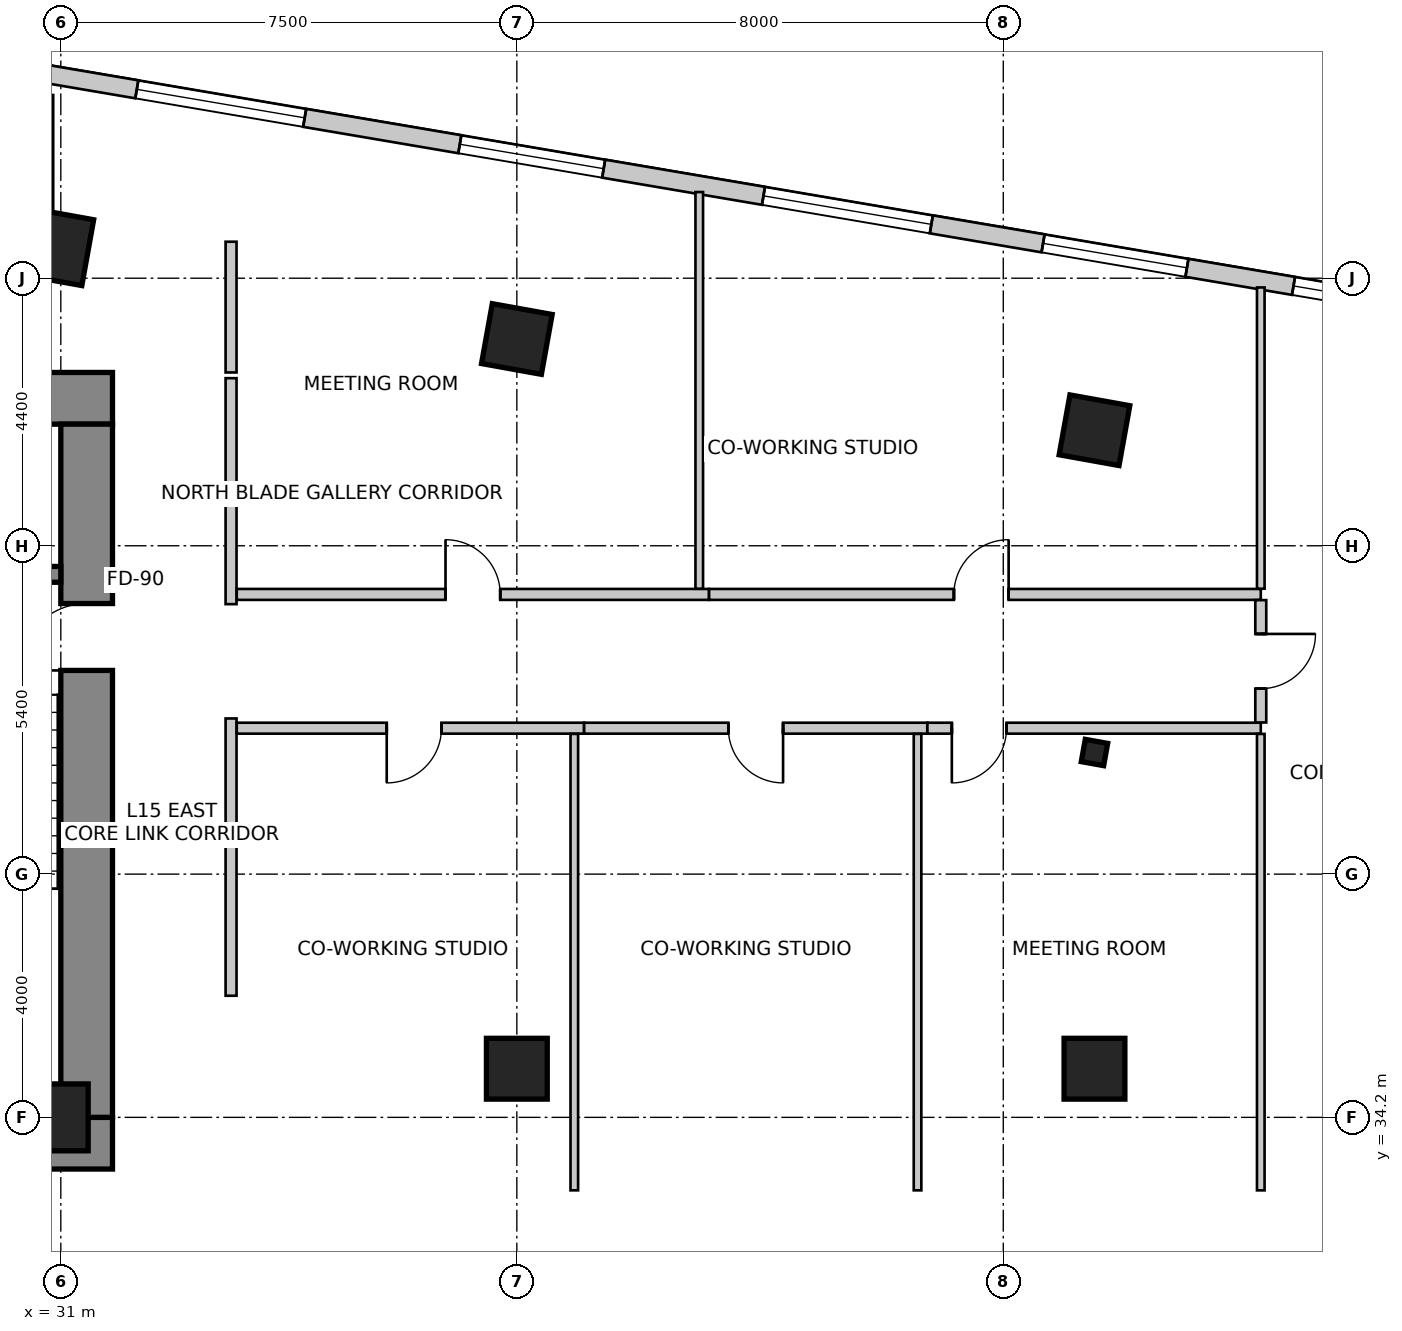
"""IFC4 building model, lengths in metres.
Left out: names, types, materials, properties, quantities, classifications, styles, units other than length and angle.
Written with IfcOpenShell. Run it as: python <this file> out.ifc"""

import sys

from ifc_helpers import new_model, si_unit, direction, frame, frame_2d, origin, origin_2d, place, context, subcontext, project, spatial, rectangle, i_section, extrude, source, transform, mapped, element, fill, save


model = new_model("IFC4")
c1 = context("Model", 3, precision=1e-05, world=origin(), true_north=direction((0.0, 1.0)))
c2 = subcontext(c1, "Body", "Model", "MODEL_VIEW")
j1 = project(units=[si_unit("LENGTHUNIT", "METRE"), si_unit("PLANEANGLEUNIT", "RADIAN")], contexts=[c1])
p1 = place(None, origin())
s1 = spatial("IfcSite", under=j1, at=p1, CompositionType="ELEMENT")
p2 = place(p1, origin())
s2 = spatial("IfcBuilding", under=s1, at=p2, CompositionType="ELEMENT")
p3 = place(p2, frame((0.0, 0.0, 63.0)))
s3 = spatial("IfcBuildingStorey", under=s2, at=p3, CompositionType="ELEMENT", Elevation=63.0)
p4 = place(p3, frame((15.75, 46.025, 0.0), z_axis=(0.0, 0.0, 1.0), x_axis=(1.0, 0.0, 0.0)))
e1 = element("IfcWall", 1, at=p4, inside=s3, PredefinedType="SHEAR", context=c2, shape_type="SweptSolid", body=[
    extrude(rectangle(XDim=16.1, YDim=0.85, at=frame_2d((8.05, 0.0))), origin(), (0.0, 0.0, 1.0), 4.0),
])
p5 = place(p3, frame((15.75, 33.775, 0.0), z_axis=(0.0, 0.0, 1.0), x_axis=(1.0, 0.0, 0.0)))
e2 = element("IfcWall", 2, at=p5, inside=s3, PredefinedType="SHEAR", context=c2, shape_type="SweptSolid", body=[
    extrude(rectangle(XDim=16.1, YDim=0.85, at=frame_2d((8.05, 0.0))), origin(), (0.0, 0.0, 1.0), 4.0),
])
m1 = source(origin(), c2, "Body", "SweptSolid", [
    extrude(rectangle(XDim=1.3, YDim=2.15, at=frame_2d((0.65, 1.075))), frame((0.0, 0.435, 0.0), z_axis=(0.0, -1.0, 0.0), x_axis=(1.0, 0.0, 0.0)), (0.0, 0.0, 1.0), 0.87),
])
p6 = place(p5, frame((10.18, 0.0, 0.0)))
e3 = element("IfcOpeningElement", 3, at=p6, cuts=e2, PredefinedType="OPENING", context=c2, shape_type="MappedRepresentation", body=[
    mapped(m1, transform((0.0, 0.0, 0.0), scale=1.0)),
])
p7 = place(p3, frame((31.425, 34.2, 0.0), z_axis=(0.0, 0.0, 1.0), x_axis=(0.0, 1.0, 0.0)))
e4 = element("IfcWall", 4, at=p7, inside=s3, PredefinedType="SHEAR", context=c2, shape_type="SweptSolid", body=[
    extrude(rectangle(XDim=11.4, YDim=0.85, at=frame_2d((5.7, 0.0))), origin(), (0.0, 0.0, 1.0), 4.0),
])
m2 = source(origin(), c2, "Body", "SweptSolid", [
    extrude(rectangle(XDim=1.1, YDim=2.15, at=frame_2d((0.55, 1.075))), frame((0.0, 0.435, 0.0), z_axis=(0.0, -1.0, 0.0), x_axis=(1.0, 0.0, 0.0)), (0.0, 0.0, 1.0), 0.87),
])
p8 = place(p7, frame((7.35, 0.0, 0.0)))
e5 = element("IfcOpeningElement", 5, at=p8, cuts=e4, PredefinedType="OPENING", context=c2, shape_type="MappedRepresentation", body=[
    mapped(m2, transform((0.0, 0.0, 0.0), scale=1.0)),
])
p9 = place(p3, frame((27.5, 43.13, 0.0), z_axis=(0.0, 0.0, 1.0), x_axis=(1.0, 0.0, 0.0)))
e6 = element("IfcWall", 6, at=p9, inside=s3, PredefinedType="SHEAR", context=c2, shape_type="SweptSolid", body=[
    extrude(rectangle(XDim=3.5, YDim=0.26, at=frame_2d((1.75, 0.0))), origin(), (0.0, 0.0, 1.0), 4.0),
])
m3 = source(origin(), c2, "Body", "SweptSolid", [
    extrude(rectangle(XDim=0.9, YDim=1.1, at=origin_2d()), origin(), (0.0, 0.0, 1.0), 4.0),
])
p10 = place(p3, frame((31.0, 48.5, 0.0), z_axis=(0.0, 0.0, 1.0), x_axis=(0.984195607969, -0.17708474032, 0.0)))
e7 = element("IfcColumn", 7, at=p10, inside=s3, PredefinedType="COLUMN", context=c2, shape_type="MappedRepresentation", body=[
    mapped(m3, transform((0.0, 0.0, 0.0), scale=1.0)),
])
m4 = source(origin(), c2, "Body", "SweptSolid", [
    extrude(rectangle(XDim=1.0, YDim=1.0, at=origin_2d()), origin(), (0.0, 0.0, 1.0), 4.0),
])
for number, where, z_axis, x_axis in (
    (8, (38.5, 47.0, 0.0), (0.0, 0.0, 1.0), (0.984, -0.177, 0.0)),
    (9, (48.0, 45.5, 0.0), (0.0, 0.0, 1.0), (0.984, -0.177, 0.0)),
):
    element("IfcColumn", number, at=place(p3, frame(where, z_axis=z_axis, x_axis=x_axis)), inside=s3, PredefinedType="COLUMN", context=c2, shape_type="MappedRepresentation", body=[
        mapped(m4, transform((0.0, 0.0, 0.0), scale=1.0)),
    ])
p11 = place(p3, frame((31.0, 34.2, 0.0), z_axis=(0.0, 0.0, 1.0), x_axis=(1.0, 0.0, 0.0)))
e10 = element("IfcColumn", 10, at=p11, inside=s3, PredefinedType="COLUMN", context=c2, shape_type="MappedRepresentation", body=[
    mapped(m3, transform((0.0, 0.0, 0.0), scale=1.0)),
])
for number, where, z_axis, x_axis in (
    (11, (38.5, 35.0, 0.0), (0.0, 0.0, 1.0), (1.0, 0.0, 0.0)),
    (12, (48.0, 35.0, 0.0), (0.0, 0.0, 1.0), (1.0, 0.0, 0.0)),
):
    element("IfcColumn", number, at=place(p3, frame(where, z_axis=z_axis, x_axis=x_axis)), inside=s3, PredefinedType="COLUMN", context=c2, shape_type="MappedRepresentation", body=[
        mapped(m4, transform((0.0, 0.0, 0.0), scale=1.0)),
    ])
m5 = source(origin(), c2, "Body", "SweptSolid", [
    extrude(i_section(OverallWidth=0.374, OverallDepth=0.372, WebThickness=0.016, FlangeThickness=0.026, FilletRadius=0.015, at=origin_2d()), origin(), (0.0, 0.0, 1.0), 4.0),
])
p12 = place(p3, frame((48.0, 40.2, 0.0), z_axis=(0.0, 0.0, 1.0), x_axis=(0.984195607969, -0.17708474032, 0.0)))
e13 = element("IfcColumn", 13, at=p12, inside=s3, PredefinedType="COLUMN", context=c2, shape_type="MappedRepresentation", body=[
    mapped(m5, transform((0.0, 0.0, 0.0), scale=1.0)),
])
p13 = place(p3, frame((53.961, 47.417, 0.0), z_axis=(0.0, 0.0, 1.0), x_axis=(-0.985865713455, 0.167537443678, 0.0)))
e14 = element("IfcWall", 14, at=p13, inside=s3, PredefinedType="SOLIDWALL", context=c2, shape_type="SweptSolid", body=[
    extrude(rectangle(XDim=32.537, YDim=0.3, at=frame_2d((16.269, 0.0))), origin(), (0.0, 0.0, 1.0), 3.75),
])
m6 = source(origin(), c2, "Body", "SweptSolid", [
    extrude(rectangle(XDim=2.1, YDim=2.0, at=frame_2d((1.05, 1.0))), frame((0.0, 0.16, 0.0), z_axis=(0.0, -1.0, 0.0), x_axis=(1.0, 0.0, 0.0)), (0.0, 0.0, 1.0), 0.32),
])
p14 = place(p13, frame((0.626, 0.0, 0.85)))
e15 = element("IfcOpeningElement", 15, at=p14, cuts=e14, PredefinedType="OPENING", context=c2, shape_type="MappedRepresentation", body=[
    mapped(m6, transform((0.0, 0.0, 0.0), scale=1.0)),
])
m7 = source(origin(), c2, "Body", "SweptSolid", [
    extrude(rectangle(XDim=2.4, YDim=2.2, at=frame_2d((1.2, 1.1))), frame((0.0, 0.16, 0.0), z_axis=(0.0, -1.0, 0.0), x_axis=(1.0, 0.0, 0.0)), (0.0, 0.0, 1.0), 0.32),
])
p15 = place(p13, frame((4.504, 0.0, 0.85)))
e16 = element("IfcOpeningElement", 16, at=p15, cuts=e14, PredefinedType="OPENING", context=c2, shape_type="MappedRepresentation", body=[
    mapped(m7, transform((0.0, 0.0, 0.0), scale=1.0)),
])
m8 = source(origin(), c2, "Body", "SweptSolid", [
    extrude(rectangle(XDim=2.8, YDim=2.4, at=frame_2d((1.4, 1.2))), frame((0.0, 0.16, 0.0), z_axis=(0.0, -1.0, 0.0), x_axis=(1.0, 0.0, 0.0)), (0.0, 0.0, 1.0), 0.32),
])
p16 = place(p13, frame((8.768, 0.0, 0.85)))
e17 = element("IfcOpeningElement", 17, at=p16, cuts=e14, PredefinedType="OPENING", context=c2, shape_type="MappedRepresentation", body=[
    mapped(m8, transform((0.0, 0.0, 0.0), scale=1.0)),
])
p17 = place(p13, frame((14.234, 0.0, 0.85)))
e18 = element("IfcOpeningElement", 18, at=p17, cuts=e14, PredefinedType="OPENING", context=c2, shape_type="MappedRepresentation", body=[
    mapped(m7, transform((0.0, 0.0, 0.0), scale=1.0)),
])
p18 = place(p13, frame((19.222, 0.0, 0.85)))
e19 = element("IfcOpeningElement", 19, at=p18, cuts=e14, PredefinedType="OPENING", context=c2, shape_type="MappedRepresentation", body=[
    mapped(m8, transform((0.0, 0.0, 0.0), scale=1.0)),
])
p19 = place(p13, frame((25.095, 0.0, 0.85)))
e20 = element("IfcOpeningElement", 20, at=p19, cuts=e14, PredefinedType="OPENING", context=c2, shape_type="MappedRepresentation", body=[
    mapped(m7, transform((0.0, 0.0, 0.0), scale=1.0)),
])
p20 = place(p13, frame((29.595, 0.0, 0.85)))
e21 = element("IfcOpeningElement", 21, at=p20, cuts=e14, PredefinedType="OPENING", context=c2, shape_type="MappedRepresentation", body=[
    mapped(m7, transform((0.0, 0.0, 0.0), scale=1.0)),
])
p21 = place(p3, frame((25.362, 48.6, 0.0), z_axis=(0.0, 0.0, 1.0), x_axis=(1.0, 0.0, 0.0)))
e22 = element("IfcWall", 22, at=p21, inside=s3, PredefinedType="PARTITIONING", context=c2, shape_type="SweptSolid", body=[
    extrude(rectangle(XDim=5.598, YDim=0.18, at=frame_2d((2.799, 0.0))), origin(), (0.0, 0.0, 1.0), 2.892),
])
m9 = source(origin(), c2, "Body", "SweptSolid", [
    extrude(rectangle(XDim=0.9, YDim=2.15, at=frame_2d((0.45, 1.075))), frame((0.0, 0.1, 0.0), z_axis=(0.0, -1.0, 0.0), x_axis=(1.0, 0.0, 0.0)), (0.0, 0.0, 1.0), 0.2),
])
p22 = place(p21, frame((2.349, 0.0, 0.0)))
e23 = element("IfcOpeningElement", 23, at=p22, cuts=e22, PredefinedType="OPENING", context=c2, shape_type="MappedRepresentation", body=[
    mapped(m9, transform((0.0, 0.0, 0.0), scale=1.0)),
])
p23 = place(p3, frame((33.8, 48.6, 0.0), z_axis=(0.0, 0.0, 1.0), x_axis=(0.0, -1.0, 0.0)))
e24 = element("IfcWall", 24, at=p23, inside=s3, PredefinedType="PARTITIONING", context=c2, shape_type="SweptSolid", body=[
    extrude(rectangle(XDim=2.15, YDim=0.18, at=frame_2d((1.075, 0.0))), origin(), (0.0, 0.0, 1.0), 2.892),
])
p24 = place(p3, frame((33.8, 40.76, 0.0), z_axis=(0.0, 0.0, 1.0), x_axis=(0.0, -1.0, 0.0)))
e25 = element("IfcWall", 25, at=p24, inside=s3, PredefinedType="PARTITIONING", context=c2, shape_type="SweptSolid", body=[
    extrude(rectangle(XDim=4.56, YDim=0.18, at=frame_2d((2.28, 0.0))), origin(), (0.0, 0.0, 1.0), 3.75),
])
p25 = place(p3, frame((33.8, 46.356, 0.0), z_axis=(0.0, 0.0, 1.0), x_axis=(0.0, -1.0, 0.0)))
e26 = element("IfcWall", 26, at=p25, inside=s3, PredefinedType="PARTITIONING", context=c2, shape_type="SweptSolid", body=[
    extrude(rectangle(XDim=3.716, YDim=0.18, at=frame_2d((1.858, 0.0))), origin(), (0.0, 0.0, 1.0), 3.188),
])
p26 = place(p3, frame((39.605, 40.6, 0.0), z_axis=(0.0, 0.0, 1.0), x_axis=(-1.0, 0.0, 0.0)))
e27 = element("IfcWall", 27, at=p26, inside=s3, PredefinedType="PARTITIONING", context=c2, shape_type="SweptSolid", body=[
    extrude(rectangle(XDim=5.711, YDim=0.18, at=frame_2d((2.855, 0.0))), origin(), (0.0, 0.0, 1.0), 3.125),
])
p27 = place(p26, frame((2.345, 0.0, 0.0)))
e28 = element("IfcOpeningElement", 28, at=p27, cuts=e27, PredefinedType="OPENING", context=c2, shape_type="MappedRepresentation", body=[
    mapped(m9, transform((0.0, 0.0, 0.0), scale=1.0)),
])
p28 = place(p3, frame((45.25, 40.6, 0.0), z_axis=(0.0, 0.0, 1.0), x_axis=(-1.0, 0.0, 0.0)))
e29 = element("IfcWall", 29, at=p28, inside=s3, PredefinedType="PARTITIONING", context=c2, shape_type="SweptSolid", body=[
    extrude(rectangle(XDim=5.643, YDim=0.18, at=frame_2d((2.822, 0.0))), origin(), (0.0, 0.0, 1.0), 3.188),
])
p29 = place(p28, frame((2.372, 0.0, 0.0)))
e30 = element("IfcOpeningElement", 30, at=p29, cuts=e29, PredefinedType="OPENING", context=c2, shape_type="MappedRepresentation", body=[
    mapped(m9, transform((0.0, 0.0, 0.0), scale=1.0)),
])
p30 = place(p3, frame((50.735, 40.6, 0.0), z_axis=(0.0, 0.0, 1.0), x_axis=(-1.0, 0.0, 0.0)))
e31 = element("IfcWall", 31, at=p30, inside=s3, PredefinedType="PARTITIONING", context=c2, shape_type="SweptSolid", body=[
    extrude(rectangle(XDim=5.483, YDim=0.18, at=frame_2d((2.742, 0.0))), origin(), (0.0, 0.0, 1.0), 3.125),
])
p31 = place(p30, frame((4.181, 0.0, 0.0)))
e32 = element("IfcOpeningElement", 32, at=p31, cuts=e31, PredefinedType="OPENING", context=c2, shape_type="MappedRepresentation", body=[
    mapped(m9, transform((0.0, 0.0, 0.0), scale=1.0)),
])
p32 = place(p3, frame((33.894, 42.8, 0.0), z_axis=(0.0, 0.0, 1.0), x_axis=(1.0, 0.0, 0.0)))
e33 = element("IfcWall", 33, at=p32, inside=s3, PredefinedType="PARTITIONING", context=c2, shape_type="SweptSolid", body=[
    extrude(rectangle(XDim=7.766, YDim=0.18, at=frame_2d((3.883, 0.0))), origin(), (0.0, 0.0, 1.0), 3.125),
])
p33 = place(p32, frame((3.433, 0.0, 0.0)))
e34 = element("IfcOpeningElement", 34, at=p33, cuts=e33, PredefinedType="OPENING", context=c2, shape_type="MappedRepresentation", body=[
    mapped(m9, transform((0.0, 0.0, 0.0), scale=1.0)),
])
p34 = place(p3, frame((41.662, 42.8, 0.0), z_axis=(0.0, 0.0, 1.0), x_axis=(1.0, 0.0, 0.0)))
e35 = element("IfcWall", 35, at=p34, inside=s3, PredefinedType="PARTITIONING", context=c2, shape_type="SweptSolid", body=[
    extrude(rectangle(XDim=9.073, YDim=0.18, at=frame_2d((4.537, 0.0))), origin(), (0.0, 0.0, 1.0), 3.125),
])
p35 = place(p34, frame((4.026, 0.0, 0.0)))
e36 = element("IfcOpeningElement", 36, at=p35, cuts=e35, PredefinedType="OPENING", context=c2, shape_type="MappedRepresentation", body=[
    mapped(m9, transform((0.0, 0.0, 0.0), scale=1.0)),
])
p36 = place(p3, frame((50.735, 42.706, 0.0), z_axis=(0.0, 0.0, 1.0), x_axis=(0.0, -1.0, 0.0)))
e37 = element("IfcWall", 37, at=p36, inside=s3, PredefinedType="PARTITIONING", context=c2, shape_type="SweptSolid", body=[
    extrude(rectangle(XDim=2.012, YDim=0.18, at=frame_2d((1.006, 0.0))), origin(), (0.0, 0.0, 1.0), 3.75),
])
p37 = place(p36, frame((0.556, 0.0, 0.0)))
e38 = element("IfcOpeningElement", 38, at=p37, cuts=e37, PredefinedType="OPENING", context=c2, shape_type="MappedRepresentation", body=[
    mapped(m9, transform((0.0, 0.0, 0.0), scale=1.0)),
])
for number, where, z_axis, x_axis in (
    (39, (39.445, 40.506, 0.0), (0.0, 0.0, 1.0), (0.0, -1.0, 0.0)),
    (40, (45.09, 40.506, 0.0), (0.0, 0.0, 1.0), (0.0, -1.0, 0.0)),
):
    element("IfcWall", number, at=place(p3, frame(where, z_axis=z_axis, x_axis=x_axis)), inside=s3, PredefinedType="PARTITIONING", context=c2, shape_type="SweptSolid", body=[
        extrude(rectangle(XDim=7.506, YDim=0.125, at=frame_2d((3.753, 0.0))), origin(), (0.0, 0.0, 1.0), 2.892),
    ])
p38 = place(p3, frame((50.735, 40.506, 0.0), z_axis=(0.0, 0.0, 1.0), x_axis=(0.0, -1.0, 0.0)))
e41 = element("IfcWall", 41, at=p38, inside=s3, PredefinedType="PARTITIONING", context=c2, shape_type="SweptSolid", body=[
    extrude(rectangle(XDim=7.506, YDim=0.125, at=frame_2d((3.753, 0.0))), origin(), (0.0, 0.0, 1.0), 3.75),
])
p39 = place(p3, frame((41.5, 49.417, 0.0), z_axis=(0.0, 0.0, 1.0), x_axis=(0.0, -1.0, 0.0)))
e42 = element("IfcWall", 42, at=p39, inside=s3, PredefinedType="PARTITIONING", context=c2, shape_type="SweptSolid", body=[
    extrude(rectangle(XDim=6.523, YDim=0.125, at=frame_2d((3.262, 0.0))), origin(), (0.0, 0.0, 1.0), 2.892),
])
p40 = place(p3, frame((50.735, 47.848, 0.0), z_axis=(0.0, 0.0, 1.0), x_axis=(0.0, -1.0, 0.0)))
e43 = element("IfcWall", 43, at=p40, inside=s3, PredefinedType="PARTITIONING", context=c2, shape_type="SweptSolid", body=[
    extrude(rectangle(XDim=4.954, YDim=0.125, at=frame_2d((2.477, 0.0))), origin(), (0.0, 0.0, 1.0), 3.75),
])
p41 = place(p3, frame((30.8, 51.013, 0.0), z_axis=(0.0, 0.0, 1.0), x_axis=(0.0, -1.0, 0.0)))
e44 = element("IfcWall", 44, at=p41, inside=s3, PredefinedType="PARTITIONING", context=c2, shape_type="SweptSolid", body=[
    extrude(rectangle(XDim=2.193, YDim=0.15, at=frame_2d((1.096, 0.0))), origin(), (0.0, 0.0, 1.0), 3.75),
])
m10 = source(origin(), c2, "Body", "SweptSolid", [
    extrude(rectangle(XDim=2.1, YDim=2.0, at=frame_2d((1.05, 1.0))), frame((0.0, -0.015, 0.0), z_axis=(0.0, -1.0, 0.0), x_axis=(1.0, 0.0, 0.0)), (0.0, 0.0, 1.0), 0.06),
])
p42 = place(p14, origin())
e45 = element("IfcWindow", 45, at=p42, inside=s3, PartitioningType="SINGLE_PANEL", PredefinedType="WINDOW", context=c2, shape_type="MappedRepresentation", body=[
    mapped(m10, transform((0.0, 0.0, 0.0), scale=1.0)),
])
fill(e15, e45)
m11 = source(origin(), c2, "Body", "SweptSolid", [
    extrude(rectangle(XDim=2.4, YDim=2.2, at=frame_2d((1.2, 1.1))), frame((0.0, -0.015, 0.0), z_axis=(0.0, -1.0, 0.0), x_axis=(1.0, 0.0, 0.0)), (0.0, 0.0, 1.0), 0.06),
])
p43 = place(p15, origin())
e46 = element("IfcWindow", 46, at=p43, inside=s3, PartitioningType="SINGLE_PANEL", PredefinedType="WINDOW", context=c2, shape_type="MappedRepresentation", body=[
    mapped(m11, transform((0.0, 0.0, 0.0), scale=1.0)),
])
fill(e16, e46)
m12 = source(origin(), c2, "Body", "SweptSolid", [
    extrude(rectangle(XDim=2.8, YDim=2.4, at=frame_2d((1.4, 1.2))), frame((0.0, -0.015, 0.0), z_axis=(0.0, -1.0, 0.0), x_axis=(1.0, 0.0, 0.0)), (0.0, 0.0, 1.0), 0.06),
])
p44 = place(p16, origin())
e47 = element("IfcWindow", 47, at=p44, inside=s3, PartitioningType="SINGLE_PANEL", PredefinedType="WINDOW", context=c2, shape_type="MappedRepresentation", body=[
    mapped(m12, transform((0.0, 0.0, 0.0), scale=1.0)),
])
fill(e17, e47)
p45 = place(p17, origin())
e48 = element("IfcWindow", 48, at=p45, inside=s3, PartitioningType="SINGLE_PANEL", PredefinedType="WINDOW", context=c2, shape_type="MappedRepresentation", body=[
    mapped(m11, transform((0.0, 0.0, 0.0), scale=1.0)),
])
fill(e18, e48)
p46 = place(p18, origin())
e49 = element("IfcWindow", 49, at=p46, inside=s3, PartitioningType="SINGLE_PANEL", PredefinedType="WINDOW", context=c2, shape_type="MappedRepresentation", body=[
    mapped(m12, transform((0.0, 0.0, 0.0), scale=1.0)),
])
fill(e19, e49)
m13 = source(origin(), c2, "Body", "SweptSolid", [
    extrude(rectangle(XDim=1.1, YDim=2.15, at=frame_2d((0.55, 1.075))), frame((0.0, 0.025, 0.0), z_axis=(0.0, -1.0, 0.0), x_axis=(1.0, 0.0, 0.0)), (0.0, 0.0, 1.0), 0.05),
])
p47 = place(p8, origin())
e50 = element("IfcDoor", 50, at=p47, inside=s3, OperationType="SINGLE_SWING_LEFT", PredefinedType="DOOR", context=c2, shape_type="MappedRepresentation", body=[
    mapped(m13, transform((0.0, 0.0, 0.0), scale=1.0)),
])
fill(e5, e50)
m14 = source(origin(), c2, "Body", "SweptSolid", [
    extrude(rectangle(XDim=0.9, YDim=2.15, at=frame_2d((0.45, 1.075))), frame((0.0, 0.025, 0.0), z_axis=(0.0, -1.0, 0.0), x_axis=(1.0, 0.0, 0.0)), (0.0, 0.0, 1.0), 0.05),
])
p48 = place(p27, origin())
e51 = element("IfcDoor", 51, at=p48, inside=s3, OperationType="SINGLE_SWING_RIGHT", PredefinedType="DOOR", context=c2, shape_type="MappedRepresentation", body=[
    mapped(m14, transform((0.0, 0.0, 0.0), scale=1.0)),
])
fill(e28, e51)
p49 = place(p29, origin())
e52 = element("IfcDoor", 52, at=p49, inside=s3, OperationType="SINGLE_SWING_LEFT", PredefinedType="DOOR", context=c2, shape_type="MappedRepresentation", body=[
    mapped(m14, transform((0.0, 0.0, 0.0), scale=1.0)),
])
fill(e30, e52)
p50 = place(p31, origin())
e53 = element("IfcDoor", 53, at=p50, inside=s3, OperationType="SINGLE_SWING_RIGHT", PredefinedType="DOOR", context=c2, shape_type="MappedRepresentation", body=[
    mapped(m14, transform((0.0, 0.0, 0.0), scale=1.0)),
])
fill(e32, e53)
p51 = place(p33, origin())
e54 = element("IfcDoor", 54, at=p51, inside=s3, OperationType="SINGLE_SWING_LEFT", PredefinedType="DOOR", context=c2, shape_type="MappedRepresentation", body=[
    mapped(m14, transform((0.0, 0.0, 0.0), scale=1.0)),
])
fill(e34, e54)
p52 = place(p35, origin())
e55 = element("IfcDoor", 55, at=p52, inside=s3, OperationType="SINGLE_SWING_RIGHT", PredefinedType="DOOR", context=c2, shape_type="MappedRepresentation", body=[
    mapped(m14, transform((0.0, 0.0, 0.0), scale=1.0)),
])
fill(e36, e55)
p53 = place(p37, origin())
e56 = element("IfcDoor", 56, at=p53, inside=s3, OperationType="SINGLE_SWING_LEFT", PredefinedType="DOOR", context=c2, shape_type="MappedRepresentation", body=[
    mapped(m14, transform((0.0, 0.0, 0.0), scale=1.0)),
])
fill(e38, e56)
save(model, sys.argv[1])
